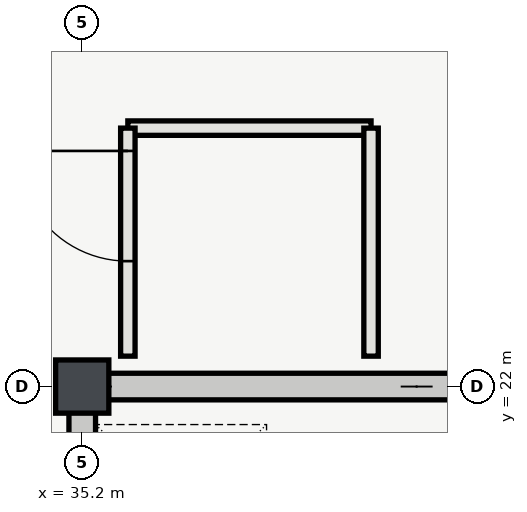
"""IFC4 building model, lengths in metres.
Left out: names, types, materials, properties, quantities, classifications, styles, units other than length and angle.
Written with IfcOpenShell. Run it as: python <this file> out.ifc"""

import sys

from ifc_helpers import new_model, si_unit, direction, frame, frame_2d, origin, origin_2d, place, context, subcontext, project, spatial, rectangle, extrude, element, fill, save


model = new_model("IFC4")
c1 = context("Model", 3, precision=1e-05, world=origin(), true_north=direction((0.0, 1.0)))
c2 = subcontext(c1, "Body", "Model", "MODEL_VIEW")
j1 = project(units=[si_unit("LENGTHUNIT", "METRE"), si_unit("PLANEANGLEUNIT", "RADIAN")], contexts=[c1])
p1 = place(None, origin())
s1 = spatial("IfcSite", under=j1, at=p1, CompositionType="ELEMENT")
p2 = place(p1, origin())
s2 = spatial("IfcBuilding", under=s1, at=p2, CompositionType="ELEMENT")
p3 = place(p2, frame((0.0, 0.0, 5.4)))
s3 = spatial("IfcBuildingStorey", under=s2, at=p3, CompositionType="ELEMENT", Elevation=5.4)
p4 = place(p3, frame((35.2, 22.0, 0.0), z_axis=(0.0, 0.0, 1.0), x_axis=(1.0, 0.0, 0.0)))
e1 = element("IfcColumn", 1, at=p4, inside=s3, PredefinedType="COLUMN", context=c2, shape_type="SweptSolid", body=[
    extrude(rectangle(XDim=0.7, YDim=0.7, at=origin_2d()), origin(), (0.0, 0.0, 1.0), 5.4),
])
p5 = place(p3, frame((44.175, 22.0, 0.0), z_axis=(0.0, 0.0, 1.0), x_axis=(-1.0, 0.0, 0.0)))
e2 = element("IfcWall", 2, at=p5, inside=s3, PredefinedType="SHEAR", context=c2, shape_type="SweptSolid", body=[
    extrude(rectangle(XDim=9.15, YDim=0.35, at=frame_2d((4.575, 0.0))), origin(), (0.0, 0.0, 1.0), 5.12),
])
p6 = place(p3, frame((35.2, 14.175, 0.0), z_axis=(0.0, 0.0, 1.0), x_axis=(0.0, 1.0, 0.0)))
e3 = element("IfcWall", 3, at=p6, inside=s3, PredefinedType="SHEAR", context=c2, shape_type="SweptSolid", body=[
    extrude(rectangle(XDim=7.65, YDim=0.35, at=frame_2d((3.825, 0.0))), origin(), (0.0, 0.0, 1.0), 5.12),
])
p7 = place(p6, frame((1.625, 0.0, 0.0)))
e4 = element("IfcOpeningElement", 4, at=p7, cuts=e3, PredefinedType="OPENING", context=c2, shape_type="SweptSolid", body=[
    extrude(rectangle(XDim=1.4, YDim=2.2, at=frame_2d((0.7, 1.1))), frame((0.0, 0.185, 0.0), z_axis=(0.0, -1.0, 0.0), x_axis=(1.0, 0.0, 0.0)), (0.0, 0.0, 1.0), 0.37),
])
p8 = place(p6, frame((5.725, 0.0, 0.0)))
e5 = element("IfcOpeningElement", 5, at=p8, cuts=e3, PredefinedType="OPENING", context=c2, shape_type="SweptSolid", body=[
    extrude(rectangle(XDim=1.0, YDim=2.15, at=frame_2d((0.5, 1.075))), frame((0.0, 0.185, 0.0), z_axis=(0.0, -1.0, 0.0), x_axis=(1.0, 0.0, 0.0)), (0.0, 0.0, 1.0), 0.37),
])
p9 = place(p3, frame((39.0, 25.4, 0.0), z_axis=(0.0, 0.0, 1.0), x_axis=(-1.0, 0.0, 0.0)))
e6 = element("IfcWall", 6, at=p9, inside=s3, PredefinedType="PARTITIONING", context=c2, shape_type="SweptSolid", body=[
    extrude(rectangle(XDim=3.2, YDim=0.19, at=frame_2d((1.6, 0.0))), origin(), (0.0, 0.0, 1.0), 5.12),
])
p10 = place(p3, frame((35.8, 25.4, 0.0), z_axis=(0.0, 0.0, 1.0), x_axis=(0.0, -1.0, 0.0)))
e7 = element("IfcWall", 7, at=p10, inside=s3, PredefinedType="PARTITIONING", context=c2, shape_type="SweptSolid", body=[
    extrude(rectangle(XDim=3.0, YDim=0.19, at=frame_2d((1.5, 0.0))), origin(), (0.0, 0.0, 1.0), 5.12),
])
p11 = place(p10, frame((0.3, 0.0, 0.0)))
e8 = element("IfcOpeningElement", 8, at=p11, cuts=e7, PredefinedType="OPENING", context=c2, shape_type="SweptSolid", body=[
    extrude(rectangle(XDim=1.45, YDim=2.2, at=frame_2d((0.725, 1.1))), frame((0.0, 0.105, 0.0), z_axis=(0.0, -1.0, 0.0), x_axis=(1.0, 0.0, 0.0)), (0.0, 0.0, 1.0), 0.21),
])
p12 = place(p3, frame((39.0, 22.4, 0.0), z_axis=(0.0, 0.0, 1.0), x_axis=(0.0, 1.0, 0.0)))
e9 = element("IfcWall", 9, at=p12, inside=s3, PredefinedType="PARTITIONING", context=c2, shape_type="SweptSolid", body=[
    extrude(rectangle(XDim=3.0, YDim=0.19, at=frame_2d((1.5, 0.0))), origin(), (0.0, 0.0, 1.0), 5.12),
])
p13 = place(p11, origin())
e10 = element("IfcDoor", 10, at=p13, inside=s3, OperationType="SINGLE_SWING_LEFT", PredefinedType="DOOR", context=c2, shape_type="SweptSolid", body=[
    extrude(rectangle(XDim=1.45, YDim=2.2, at=frame_2d((0.725, 1.1))), frame((0.0, 0.025, 0.0), z_axis=(0.0, -1.0, 0.0), x_axis=(1.0, 0.0, 0.0)), (0.0, 0.0, 1.0), 0.05),
])
fill(e8, e10)
save(model, sys.argv[1])
